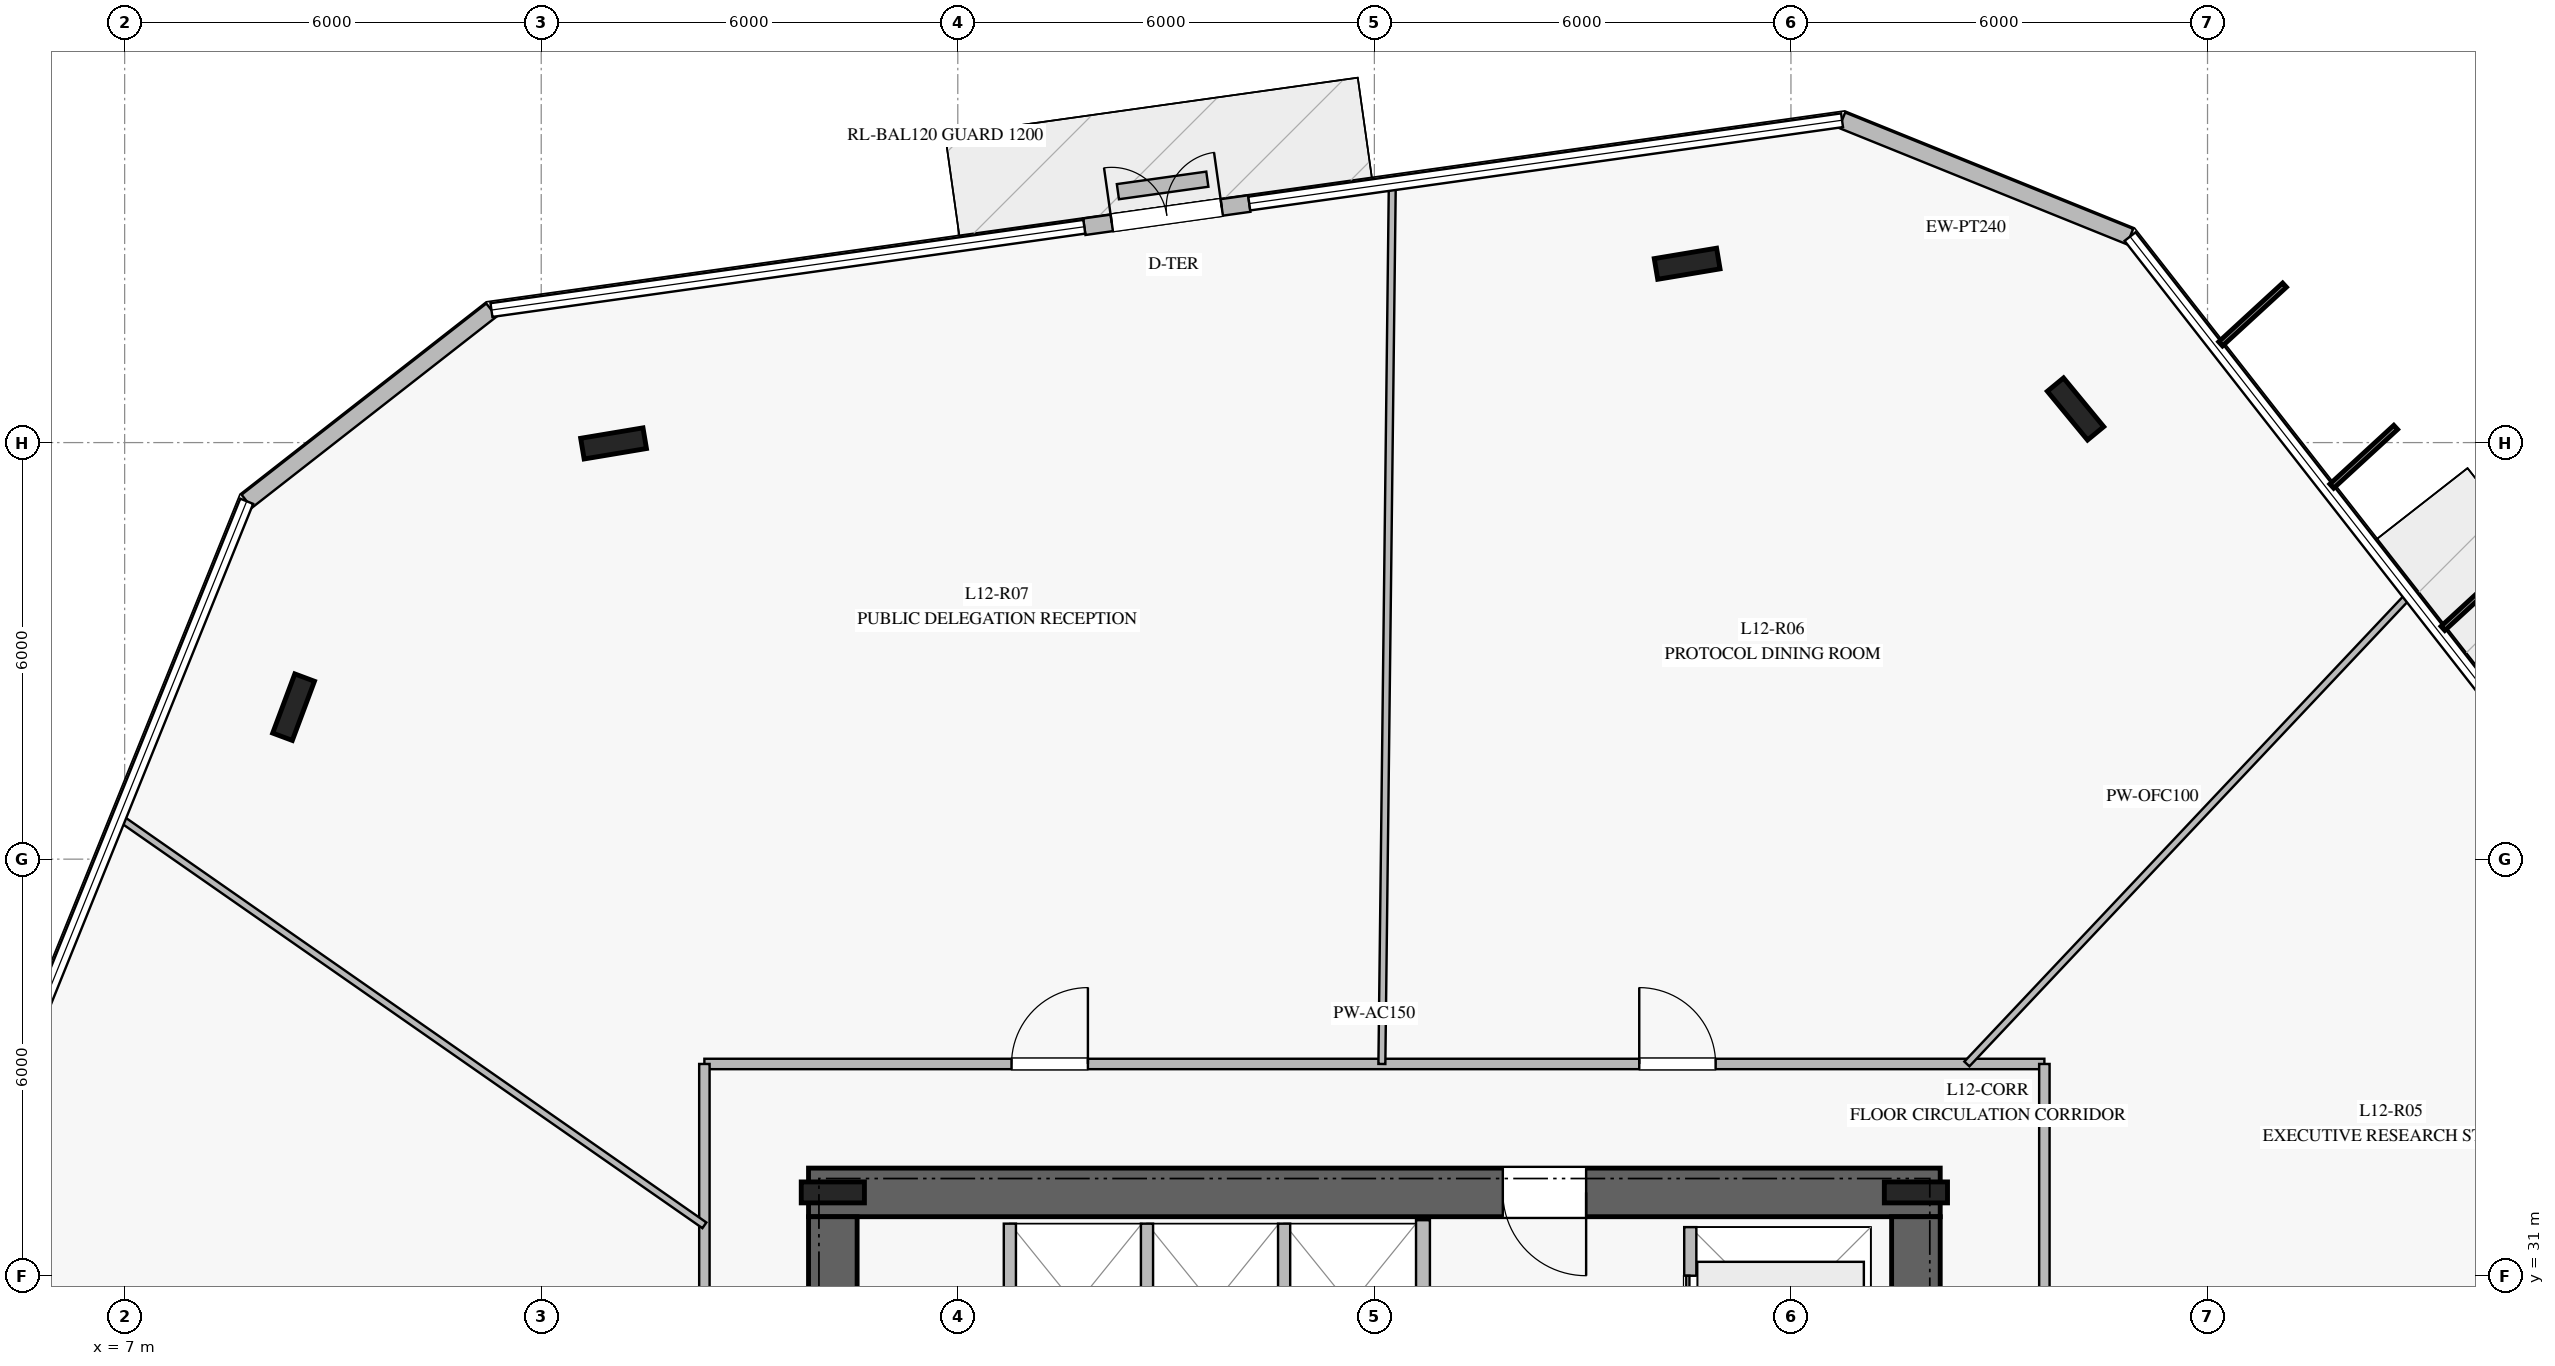
"""IFC4 building model, lengths in metres.
Left out: names, types, materials, properties, quantities, classifications, styles, units other than length and angle.
Written with IfcOpenShell. Run it as: python <this file> out.ifc"""

import sys

from ifc_helpers import new_model, si_unit, direction, frame, frame_2d, origin, origin_2d, place, context, subcontext, project, spatial, rectangle, i_section, extrude, element, fill, save


model = new_model("IFC4")
c1 = context("Model", 3, precision=1e-05, world=origin(), true_north=direction((0.0, 1.0)))
c2 = subcontext(c1, "Body", "Model", "MODEL_VIEW")
j1 = project(units=[si_unit("LENGTHUNIT", "METRE"), si_unit("PLANEANGLEUNIT", "RADIAN")], contexts=[c1])
p1 = place(None, origin())
s1 = spatial("IfcSite", under=j1, at=p1, CompositionType="ELEMENT")
p2 = place(p1, origin())
s2 = spatial("IfcBuilding", under=s1, at=p2, CompositionType="ELEMENT")
p3 = place(p2, frame((0.0, 0.0, 52.0)))
s3 = spatial("IfcBuildingStorey", under=s2, at=p3, CompositionType="ELEMENT", Elevation=52.0)
p4 = place(p3, frame((33.15, 32.2, 0.0), z_axis=(0.0, 0.0, 1.0), x_axis=(-1.0, 0.0, 0.0)))
e1 = element("IfcWall", 1, at=p4, inside=s3, PredefinedType="SHEAR", context=c2, shape_type="SweptSolid", body=[
    extrude(rectangle(XDim=16.3, YDim=0.7, at=frame_2d((8.15, 0.0))), origin(), (0.0, 0.0, 1.0), 3.76),
])
p5 = place(p4, frame((5.1, 0.0, 0.0)))
e2 = element("IfcOpeningElement", 2, at=p5, cuts=e1, PredefinedType="OPENING", context=c2, shape_type="SweptSolid", body=[
    extrude(rectangle(XDim=1.2, YDim=2.25, at=frame_2d((0.6, 1.125))), frame((0.0, 0.36, 0.0), z_axis=(0.0, -1.0, 0.0), x_axis=(1.0, 0.0, 0.0)), (0.0, 0.0, 1.0), 0.72),
])
p6 = place(p3, frame((17.2, 31.85, 0.0), z_axis=(0.0, 0.0, 1.0), x_axis=(0.0, -1.0, 0.0)))
e3 = element("IfcWall", 3, at=p6, inside=s3, PredefinedType="SHEAR", context=c2, shape_type="SweptSolid", body=[
    extrude(rectangle(XDim=13.7, YDim=0.7, at=frame_2d((6.85, 0.0))), origin(), (0.0, 0.0, 1.0), 3.76),
])
p7 = place(p6, frame((2.0, 0.0, 0.0)))
e4 = element("IfcOpeningElement", 4, at=p7, cuts=e3, PredefinedType="OPENING", context=c2, shape_type="SweptSolid", body=[
    extrude(rectangle(XDim=1.5, YDim=2.2, at=frame_2d((0.75, 1.1))), frame((0.0, 0.36, 0.0), z_axis=(0.0, -1.0, 0.0), x_axis=(1.0, 0.0, 0.0)), (0.0, 0.0, 1.0), 0.72),
])
p8 = place(p3, frame((32.8, 18.15, 0.0), z_axis=(0.0, 0.0, 1.0), x_axis=(0.0, 1.0, 0.0)))
e5 = element("IfcWall", 5, at=p8, inside=s3, PredefinedType="SHEAR", context=c2, shape_type="SweptSolid", body=[
    extrude(rectangle(XDim=13.7, YDim=0.7, at=frame_2d((6.85, 0.0))), origin(), (0.0, 0.0, 1.0), 3.76),
])
for number, where, z_axis, x_axis in (
    (6, (32.8, 32.2, 0.0), (0.0, 0.0, 1.0), (1.0, 0.0, 0.0)),
    (7, (17.2, 32.2, 0.0), (0.0, 0.0, 1.0), (1.0, 0.0, 0.0)),
    (8, (35.099, 43.484, 0.0), (0.0, 0.0, 1.0), (-0.636, 0.772, 0.0)),
    (9, (29.505, 45.576, 0.0), (0.0, 0.0, 1.0), (0.986, 0.165, 0.0)),
    (10, (14.042, 42.988, 0.0), (0.0, 0.0, 1.0), (0.986, 0.165, 0.0)),
    (11, (9.433, 39.189, 0.0), (0.0, 0.0, 1.0), (0.35, 0.937, 0.0)),
):
    element("IfcColumn", number, at=place(p3, frame(where, z_axis=z_axis, x_axis=x_axis)), inside=s3, PredefinedType="COLUMN", context=c2, shape_type="SweptSolid", body=[
        extrude(i_section(OverallWidth=0.302, OverallDepth=0.91, WebThickness=0.021, FlangeThickness=0.04, at=origin_2d()), origin(), (0.0, 0.0, 1.0), 4.0),
    ])
p9 = place(p3, frame((35.884, 45.967, 0.0), z_axis=(0.0, 0.0, 1.0), x_axis=(-0.927172587255, 0.374634479783, 0.0)))
e12 = element("IfcWall", 12, at=p9, inside=s3, PredefinedType="STANDARD", context=c2, shape_type="SweptSolid", body=[
    extrude(rectangle(XDim=4.474, YDim=0.24, at=frame_2d((2.237, 0.0))), origin(), (0.0, 0.0, 1.0), 3.76),
])
p10 = place(p3, frame((23.198, 46.443, 0.0), z_axis=(0.0, 0.0, 1.0), x_axis=(-0.990250439139, -0.139298484503, 0.0)))
e13 = element("IfcWall", 13, at=p10, inside=s3, PredefinedType="STANDARD", context=c2, shape_type="SweptSolid", body=[
    extrude(rectangle(XDim=2.399, YDim=0.24, at=frame_2d((1.2, 0.0))), origin(), (0.0, 0.0, 1.0), 3.76),
])
p11 = place(p10, frame((0.4, 0.0, 0.0)))
e14 = element("IfcOpeningElement", 14, at=p11, cuts=e13, PredefinedType="OPENING", context=c2, shape_type="SweptSolid", body=[
    extrude(rectangle(XDim=1.6, YDim=2.25, at=frame_2d((0.8, 1.125))), frame((0.0, 0.13, 0.0), z_axis=(0.0, -1.0, 0.0), x_axis=(1.0, 0.0, 0.0)), (0.0, 0.0, 1.0), 0.26),
])
p12 = place(p3, frame((12.283, 44.909, 0.0), z_axis=(0.0, 0.0, 1.0), x_axis=(-0.788016099046, -0.615654633414, 0.0)))
e15 = element("IfcWall", 15, at=p12, inside=s3, PredefinedType="STANDARD", context=c2, shape_type="SweptSolid", body=[
    extrude(rectangle(XDim=4.473, YDim=0.24, at=frame_2d((2.237, 0.0))), origin(), (0.0, 0.0, 1.0), 3.76),
])
p13 = place(p3, frame((22.594, 46.794, 0.0), z_axis=(0.0, 0.0, 1.0), x_axis=(-0.990383971487, -0.138345903523, 0.0)))
e16 = element("IfcWall", 16, at=p13, inside=s3, PredefinedType="USERDEFINED", context=c2, shape_type="SweptSolid", body=[
    extrude(rectangle(XDim=1.301, YDim=0.22, at=frame_2d((0.65, 0.0))), origin(), (0.0, 0.0, 1.0), 0.4),
])
p14 = place(p3, frame((25.7, 26.65, 0.0), z_axis=(0.0, 0.0, 1.0), x_axis=(0.0, 1.0, 0.0)))
e17 = element("IfcWall", 17, at=p14, inside=s3, PredefinedType="PARTITIONING", context=c2, shape_type="SweptSolid", body=[
    extrude(rectangle(XDim=5.15, YDim=0.2, at=frame_2d((2.575, 0.0))), origin(), (0.0, 0.0, 1.0), 3.76),
])
for number, where, z_axis, x_axis in (
    (18, (19.75, 29.4, 0.0), (0.0, 0.0, 1.0), (0.0, 1.0, 0.0)),
    (19, (21.725, 29.4, 0.0), (0.0, 0.0, 1.0), (0.0, 1.0, 0.0)),
    (20, (23.7, 29.4, 0.0), (0.0, 0.0, 1.0), (0.0, 1.0, 0.0)),
):
    element("IfcWall", number, at=place(p3, frame(where, z_axis=z_axis, x_axis=x_axis)), inside=s3, PredefinedType="PARTITIONING", context=c2, shape_type="SweptSolid", body=[
        extrude(rectangle(XDim=2.35, YDim=0.175, at=frame_2d((1.175, 0.0))), origin(), (0.0, 0.0, 1.0), 3.76),
    ])
p15 = place(p3, frame((29.55, 29.1, 0.0), z_axis=(0.0, 0.0, 1.0), x_axis=(0.0, 1.0, 0.0)))
e21 = element("IfcWall", 21, at=p15, inside=s3, PredefinedType="PARTITIONING", context=c2, shape_type="SweptSolid", body=[
    extrude(rectangle(XDim=2.6, YDim=0.175, at=frame_2d((1.3, 0.0))), origin(), (0.0, 0.0, 1.0), 3.76),
])
p16 = place(p15, frame((0.7, 0.0, 0.0)))
e22 = element("IfcOpeningElement", 22, at=p16, cuts=e21, PredefinedType="OPENING", context=c2, shape_type="SweptSolid", body=[
    extrude(rectangle(XDim=1.2, YDim=2.2, at=frame_2d((0.6, 1.1))), frame((0.0, 0.098, 0.0), z_axis=(0.0, -1.0, 0.0), x_axis=(1.0, 0.0, 0.0)), (0.0, 0.0, 1.0), 0.195),
])
p17 = place(p3, frame((15.35, 34.05, 0.0), z_axis=(0.0, 0.0, 1.0), x_axis=(1.0, 0.0, 0.0)))
e23 = element("IfcWall", 23, at=p17, inside=s3, PredefinedType="PARTITIONING", context=c2, shape_type="SweptSolid", body=[
    extrude(rectangle(XDim=19.3, YDim=0.15, at=frame_2d((9.65, 0.0))), origin(), (0.0, 0.0, 1.0), 3.21),
])
p18 = place(p17, frame((13.465, 0.0, 0.0)))
e24 = element("IfcOpeningElement", 24, at=p18, cuts=e23, PredefinedType="OPENING", context=c2, shape_type="SweptSolid", body=[
    extrude(rectangle(XDim=1.1, YDim=2.2, at=frame_2d((0.55, 1.1))), frame((0.0, 0.085, 0.0), z_axis=(0.0, -1.0, 0.0), x_axis=(1.0, 0.0, 0.0)), (0.0, 0.0, 1.0), 0.17),
])
p19 = place(p17, frame((4.424, 0.0, 0.0)))
e25 = element("IfcOpeningElement", 25, at=p19, cuts=e23, PredefinedType="OPENING", context=c2, shape_type="SweptSolid", body=[
    extrude(rectangle(XDim=1.1, YDim=2.2, at=frame_2d((0.55, 1.1))), frame((0.0, 0.085, 0.0), z_axis=(0.0, -1.0, 0.0), x_axis=(1.0, 0.0, 0.0)), (0.0, 0.0, 1.0), 0.17),
])
p20 = place(p3, frame((34.65, 34.05, 0.0), z_axis=(0.0, 0.0, 1.0), x_axis=(0.0, -1.0, 0.0)))
e26 = element("IfcWall", 26, at=p20, inside=s3, PredefinedType="PARTITIONING", context=c2, shape_type="SweptSolid", body=[
    extrude(rectangle(XDim=18.1, YDim=0.15, at=frame_2d((9.05, 0.0))), origin(), (0.0, 0.0, 1.0), 3.21),
])
p21 = place(p20, frame((12.534, 0.0, 0.0)))
e27 = element("IfcOpeningElement", 27, at=p21, cuts=e26, PredefinedType="OPENING", context=c2, shape_type="SweptSolid", body=[
    extrude(rectangle(XDim=1.1, YDim=2.2, at=frame_2d((0.55, 1.1))), frame((0.0, 0.085, 0.0), z_axis=(0.0, -1.0, 0.0), x_axis=(1.0, 0.0, 0.0)), (0.0, 0.0, 1.0), 0.17),
])
p22 = place(p20, frame((3.853, 0.0, 0.0)))
e28 = element("IfcOpeningElement", 28, at=p22, cuts=e26, PredefinedType="OPENING", context=c2, shape_type="SweptSolid", body=[
    extrude(rectangle(XDim=1.1, YDim=2.2, at=frame_2d((0.55, 1.1))), frame((0.0, 0.085, 0.0), z_axis=(0.0, -1.0, 0.0), x_axis=(1.0, 0.0, 0.0)), (0.0, 0.0, 1.0), 0.17),
])
p23 = place(p3, frame((15.35, 15.95, 0.0), z_axis=(0.0, 0.0, 1.0), x_axis=(0.0, 1.0, 0.0)))
e29 = element("IfcWall", 29, at=p23, inside=s3, PredefinedType="PARTITIONING", context=c2, shape_type="SweptSolid", body=[
    extrude(rectangle(XDim=18.1, YDim=0.15, at=frame_2d((9.05, 0.0))), origin(), (0.0, 0.0, 1.0), 3.21),
])
p24 = place(p23, frame((9.612, 0.0, 0.0)))
e30 = element("IfcOpeningElement", 30, at=p24, cuts=e29, PredefinedType="OPENING", context=c2, shape_type="SweptSolid", body=[
    extrude(rectangle(XDim=1.1, YDim=2.2, at=frame_2d((0.55, 1.1))), frame((0.0, 0.085, 0.0), z_axis=(0.0, -1.0, 0.0), x_axis=(1.0, 0.0, 0.0)), (0.0, 0.0, 1.0), 0.17),
])
p25 = place(p3, frame((33.534, 34.05, 0.0), z_axis=(0.0, 0.0, 1.0), x_axis=(0.686105608839, 0.727501954307, 0.0)))
e31 = element("IfcWall", 31, at=p25, inside=s3, PredefinedType="MOVABLE", context=c2, shape_type="SweptSolid", body=[
    extrude(rectangle(XDim=9.277, YDim=0.1, at=frame_2d((4.639, 0.0))), origin(), (0.0, 0.0, 1.0), 3.06),
])
p26 = place(p3, frame((25.108, 34.05, 0.0), z_axis=(0.0, 0.0, 1.0), x_axis=(0.011854360143, 0.999929734604, 0.0)))
e32 = element("IfcWall", 32, at=p26, inside=s3, PredefinedType="MOVABLE", context=c2, shape_type="SweptSolid", body=[
    extrude(rectangle(XDim=12.666, YDim=0.1, at=frame_2d((6.333, 0.0))), origin(), (0.0, 0.0, 1.0), 3.06),
])
p27 = place(p3, frame((15.35, 31.726, 0.0), z_axis=(0.0, 0.0, 1.0), x_axis=(-0.820386326114, 0.57180965008, 0.0)))
e33 = element("IfcWall", 33, at=p27, inside=s3, PredefinedType="MOVABLE", context=c2, shape_type="SweptSolid", body=[
    extrude(rectangle(XDim=10.259, YDim=0.1, at=frame_2d((5.129, 0.0))), origin(), (0.0, 0.0, 1.0), 3.05),
])
p28 = place(p11, frame((1.6, 0.0, 0.0), z_axis=(0.0, 0.0, 1.0), x_axis=(-1.0, 0.0, 0.0)))
e34 = element("IfcDoor", 34, at=p28, inside=s3, OperationType="DOUBLE_DOOR_SINGLE_SWING", PredefinedType="DOOR", context=c2, shape_type="SweptSolid", body=[
    extrude(rectangle(XDim=1.6, YDim=2.25, at=frame_2d((0.8, 1.125))), frame((0.0, 0.025, 0.0), z_axis=(0.0, -1.0, 0.0), x_axis=(1.0, 0.0, 0.0)), (0.0, 0.0, 1.0), 0.05),
])
fill(e14, e34)
p29 = place(p5, origin())
e35 = element("IfcDoor", 35, at=p29, inside=s3, OperationType="SINGLE_SWING_LEFT", PredefinedType="DOOR", context=c2, shape_type="SweptSolid", body=[
    extrude(rectangle(XDim=1.2, YDim=2.25, at=frame_2d((0.6, 1.125))), frame((0.0, 0.025, 0.0), z_axis=(0.0, -1.0, 0.0), x_axis=(1.0, 0.0, 0.0)), (0.0, 0.0, 1.0), 0.05),
])
fill(e2, e35)
p30 = place(p16, origin())
e36 = element("IfcDoor", 36, at=p30, inside=s3, OperationType="DOUBLE_DOOR_SLIDING", PredefinedType="DOOR", context=c2, shape_type="SweptSolid", body=[
    extrude(rectangle(XDim=1.2, YDim=2.2, at=frame_2d((0.6, 1.1))), frame((0.0, 0.025, 0.0), z_axis=(0.0, -1.0, 0.0), x_axis=(1.0, 0.0, 0.0)), (0.0, 0.0, 1.0), 0.05),
])
fill(e22, e36)
p31 = place(p18, origin())
e37 = element("IfcDoor", 37, at=p31, inside=s3, OperationType="SINGLE_SWING_LEFT", PredefinedType="DOOR", context=c2, shape_type="SweptSolid", body=[
    extrude(rectangle(XDim=1.1, YDim=2.2, at=frame_2d((0.55, 1.1))), frame((0.0, 0.025, 0.0), z_axis=(0.0, -1.0, 0.0), x_axis=(1.0, 0.0, 0.0)), (0.0, 0.0, 1.0), 0.05),
])
fill(e24, e37)
p32 = place(p19, origin())
e38 = element("IfcDoor", 38, at=p32, inside=s3, OperationType="SINGLE_SWING_RIGHT", PredefinedType="DOOR", context=c2, shape_type="SweptSolid", body=[
    extrude(rectangle(XDim=1.1, YDim=2.2, at=frame_2d((0.55, 1.1))), frame((0.0, 0.025, 0.0), z_axis=(0.0, -1.0, 0.0), x_axis=(1.0, 0.0, 0.0)), (0.0, 0.0, 1.0), 0.05),
])
fill(e25, e38)
save(model, sys.argv[1])
